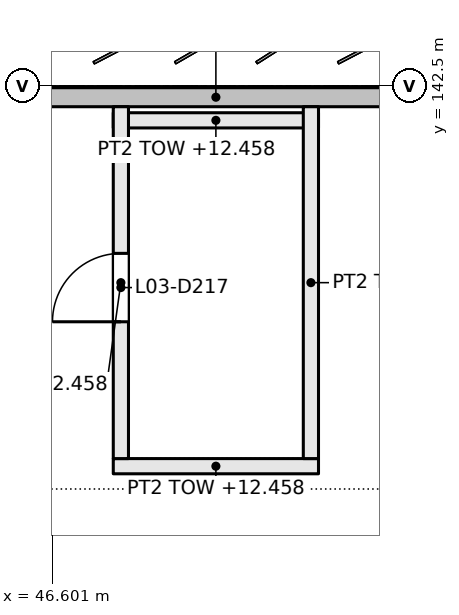
"""IFC4 building model, lengths in metres.
Left out: names, types, materials, properties, quantities, classifications, styles, units other than length and angle.
Written with IfcOpenShell. Run it as: python <this file> out.ifc"""

import sys

from ifc_helpers import new_model, si_unit, direction, frame, frame_2d, origin, place, context, subcontext, project, spatial, rectangle, extrude, element, fill, save


model = new_model("IFC4")
c1 = context("Model", 3, precision=1e-05, world=origin(), true_north=direction((0.0, 1.0)))
c2 = subcontext(c1, "Body", "Model", "MODEL_VIEW")
j1 = project(units=[si_unit("LENGTHUNIT", "METRE"), si_unit("PLANEANGLEUNIT", "RADIAN")], contexts=[c1])
p1 = place(None, origin())
s1 = spatial("IfcSite", under=j1, at=p1, CompositionType="ELEMENT")
p2 = place(p1, origin())
s2 = spatial("IfcBuilding", under=s1, at=p2, CompositionType="ELEMENT")
p3 = place(p2, frame((0.0, 0.0, 9.9)))
s3 = spatial("IfcBuildingStorey", under=s2, at=p3, CompositionType="ELEMENT", Elevation=9.9)
for number, where, z_axis, x_axis in (
    (1, (47.4, 137.5, 0.0), (0.0, 0.0, 1.0), (1.0, 0.0, 0.0)),
    (2, (47.4, 142.05, 0.0), (0.0, 0.0, 1.0), (1.0, 0.0, 0.0)),
):
    element("IfcWall", number, at=place(p3, frame(where, z_axis=z_axis, x_axis=x_axis)), inside=s3, PredefinedType="PARTITIONING", context=c2, shape_type="SweptSolid", body=[
        extrude(rectangle(XDim=2.7, YDim=0.2, at=frame_2d((1.35, 0.0))), origin(), (0.0, 0.0, 1.0), 2.558),
    ])
p4 = place(p3, frame((47.5, 137.6, 0.0), z_axis=(0.0, 0.0, 1.0), x_axis=(0.0, 1.0, 0.0)))
e3 = element("IfcWall", 3, at=p4, inside=s3, PredefinedType="PARTITIONING", context=c2, shape_type="SweptSolid", body=[
    extrude(rectangle(XDim=4.629, YDim=0.2, at=frame_2d((2.314, 0.0))), origin(), (0.0, 0.0, 1.0), 2.558),
])
p5 = place(p4, frame((1.8, 0.0, 0.0)))
e4 = element("IfcOpeningElement", 4, at=p5, cuts=e3, PredefinedType="OPENING", context=c2, shape_type="SweptSolid", body=[
    extrude(rectangle(XDim=0.9, YDim=2.1, at=frame_2d((0.45, 1.05))), frame((0.0, 0.11, 0.0), z_axis=(0.0, -1.0, 0.0), x_axis=(1.0, 0.0, 0.0)), (0.0, 0.0, 1.0), 0.22),
])
p6 = place(p3, frame((50.0, 137.6, 0.0), z_axis=(0.0, 0.0, 1.0), x_axis=(0.0, 1.0, 0.0)))
e5 = element("IfcWall", 5, at=p6, inside=s3, PredefinedType="PARTITIONING", context=c2, shape_type="SweptSolid", body=[
    extrude(rectangle(XDim=4.629, YDim=0.2, at=frame_2d((2.314, 0.0))), origin(), (0.0, 0.0, 1.0), 2.558),
])
p7 = place(p3, frame((52.348, 142.354, 0.0), z_axis=(0.0, 0.0, 1.0), x_axis=(-1.0, 0.0, 0.0)))
e6 = element("IfcWall", 6, at=p7, inside=s3, PredefinedType="SOLIDWALL", context=c2, shape_type="SweptSolid", body=[
    extrude(rectangle(XDim=7.197, YDim=0.25, at=frame_2d((3.598, 0.0))), origin(), (0.0, 0.0, 1.0), 1.1),
])
p8 = place(p5, origin())
e7 = element("IfcDoor", 7, at=p8, inside=s3, OperationType="SINGLE_SWING_RIGHT", PredefinedType="DOOR", context=c2, shape_type="SweptSolid", body=[
    extrude(rectangle(XDim=0.9, YDim=2.1, at=frame_2d((0.45, 1.05))), frame((0.0, 0.025, 0.0), z_axis=(0.0, -1.0, 0.0), x_axis=(1.0, 0.0, 0.0)), (0.0, 0.0, 1.0), 0.05),
])
fill(e4, e7)
save(model, sys.argv[1])
